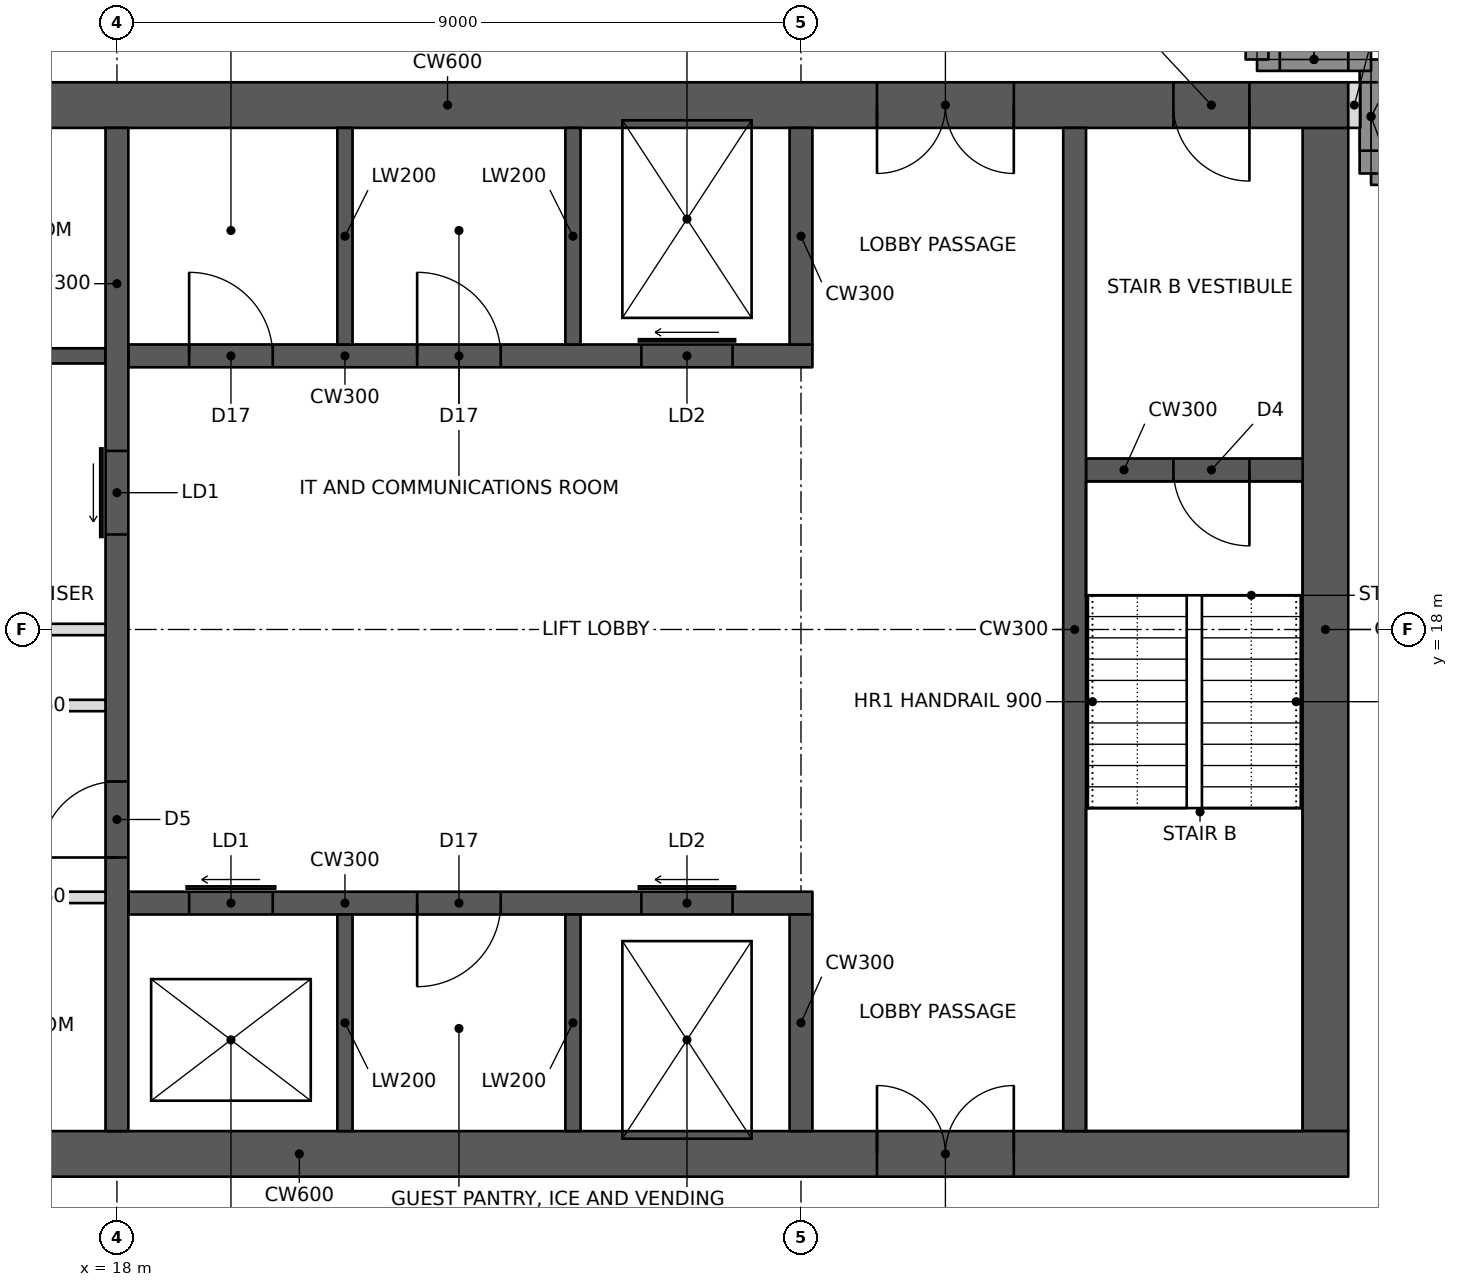
"""IFC4 building model, lengths in metres.
Left out: names, types, materials, properties, quantities, classifications, styles, units other than length and angle.
Written with IfcOpenShell. Run it as: python <this file> out.ifc"""

import sys

from ifc_helpers import new_model, si_unit, direction, frame, frame_2d, origin, place, context, subcontext, project, spatial, rectangle, extrude, element, fill, save


model = new_model("IFC4")
c1 = context("Model", 3, precision=1e-05, world=origin(), true_north=direction((0.0, 1.0)))
c2 = subcontext(c1, "Body", "Model", "MODEL_VIEW")
j1 = project(units=[si_unit("LENGTHUNIT", "METRE"), si_unit("PLANEANGLEUNIT", "RADIAN")], contexts=[c1])
p1 = place(None, origin())
s1 = spatial("IfcSite", under=j1, at=p1, CompositionType="ELEMENT")
p2 = place(p1, origin())
s2 = spatial("IfcBuilding", under=s1, at=p2, CompositionType="ELEMENT")
p3 = place(p2, frame((0.0, 0.0, 237.4)))
s3 = spatial("IfcBuildingStorey", under=s2, at=p3, CompositionType="ELEMENT", Elevation=237.4)
p4 = place(p3, frame((10.8, 11.1, 0.0), z_axis=(0.0, 0.0, 1.0), x_axis=(1.0, 0.0, 0.0)))
e1 = element("IfcWall", 1, at=p4, inside=s3, PredefinedType="SHEAR", context=c2, shape_type="SweptSolid", body=[
    extrude(rectangle(XDim=23.4, YDim=0.6, at=frame_2d((11.7, 0.0))), origin(), (0.0, 0.0, 1.0), 3.6),
])
p5 = place(p4, frame((1.0, 0.0, 0.0)))
e2 = element("IfcOpeningElement", 2, at=p5, cuts=e1, PredefinedType="OPENING", context=c2, shape_type="SweptSolid", body=[
    extrude(rectangle(XDim=1.0, YDim=2.1, at=frame_2d((0.5, 1.05))), frame((0.0, 0.31, 0.0), z_axis=(0.0, -1.0, 0.0), x_axis=(1.0, 0.0, 0.0)), (0.0, 0.0, 1.0), 0.62),
])
p6 = place(p4, frame((17.2, 0.0, 0.0)))
e3 = element("IfcOpeningElement", 3, at=p6, cuts=e1, PredefinedType="OPENING", context=c2, shape_type="SweptSolid", body=[
    extrude(rectangle(XDim=1.8, YDim=2.1, at=frame_2d((0.9, 1.05))), frame((0.0, 0.31, 0.0), z_axis=(0.0, -1.0, 0.0), x_axis=(1.0, 0.0, 0.0)), (0.0, 0.0, 1.0), 0.62),
])
p7 = place(p3, frame((10.8, 24.9, 0.0), z_axis=(0.0, 0.0, 1.0), x_axis=(1.0, 0.0, 0.0)))
e4 = element("IfcWall", 4, at=p7, inside=s3, PredefinedType="SHEAR", context=c2, shape_type="SweptSolid", body=[
    extrude(rectangle(XDim=23.4, YDim=0.6, at=frame_2d((11.7, 0.0))), origin(), (0.0, 0.0, 1.0), 3.6),
])
p8 = place(p7, frame((17.2, 0.0, 0.0)))
e5 = element("IfcOpeningElement", 5, at=p8, cuts=e4, PredefinedType="OPENING", context=c2, shape_type="SweptSolid", body=[
    extrude(rectangle(XDim=1.8, YDim=2.1, at=frame_2d((0.9, 1.05))), frame((0.0, 0.31, 0.0), z_axis=(0.0, -1.0, 0.0), x_axis=(1.0, 0.0, 0.0)), (0.0, 0.0, 1.0), 0.62),
])
p9 = place(p7, frame((21.1, 0.0, 0.0)))
e6 = element("IfcOpeningElement", 6, at=p9, cuts=e4, PredefinedType="OPENING", context=c2, shape_type="SweptSolid", body=[
    extrude(rectangle(XDim=1.0, YDim=2.1, at=frame_2d((0.5, 1.05))), frame((0.0, 0.31, 0.0), z_axis=(0.0, -1.0, 0.0), x_axis=(1.0, 0.0, 0.0)), (0.0, 0.0, 1.0), 0.62),
])
p10 = place(p7, frame((4.9, 0.0, 0.0)))
e7 = element("IfcOpeningElement", 7, at=p10, cuts=e4, PredefinedType="OPENING", context=c2, shape_type="SweptSolid", body=[
    extrude(rectangle(XDim=1.0, YDim=2.1, at=frame_2d((0.5, 1.05))), frame((0.0, 0.31, 0.0), z_axis=(0.0, -1.0, 0.0), x_axis=(1.0, 0.0, 0.0)), (0.0, 0.0, 1.0), 0.62),
])
p11 = place(p3, frame((33.9, 11.4, 0.0), z_axis=(0.0, 0.0, 1.0), x_axis=(0.0, 1.0, 0.0)))
e8 = element("IfcWall", 8, at=p11, inside=s3, PredefinedType="SHEAR", context=c2, shape_type="SweptSolid", body=[
    extrude(rectangle(XDim=13.2, YDim=0.6, at=frame_2d((6.6, 0.0))), origin(), (0.0, 0.0, 1.0), 3.6),
])
p12 = place(p3, frame((18.0, 11.4, 0.0), z_axis=(0.0, 0.0, 1.0), x_axis=(0.0, 1.0, 0.0)))
e9 = element("IfcWall", 9, at=p12, inside=s3, PredefinedType="SHEAR", context=c2, shape_type="SweptSolid", body=[
    extrude(rectangle(XDim=13.2, YDim=0.3, at=frame_2d((6.6, 0.0))), origin(), (0.0, 0.0, 1.0), 3.6),
])
p13 = place(p12, frame((3.6, 0.0, 0.0)))
e10 = element("IfcOpeningElement", 10, at=p13, cuts=e9, PredefinedType="OPENING", context=c2, shape_type="SweptSolid", body=[
    extrude(rectangle(XDim=1.0, YDim=2.1, at=frame_2d((0.5, 1.05))), frame((0.0, 0.16, 0.0), z_axis=(0.0, -1.0, 0.0), x_axis=(1.0, 0.0, 0.0)), (0.0, 0.0, 1.0), 0.32),
])
p14 = place(p12, frame((7.85, 0.0, 0.0)))
e11 = element("IfcOpeningElement", 11, at=p14, cuts=e9, PredefinedType="OPENING", context=c2, shape_type="SweptSolid", body=[
    extrude(rectangle(XDim=1.1, YDim=2.1, at=frame_2d((0.55, 1.05))), frame((0.0, 0.16, 0.0), z_axis=(0.0, -1.0, 0.0), x_axis=(1.0, 0.0, 0.0)), (0.0, 0.0, 1.0), 0.32),
])
p15 = place(p3, frame((14.55, 18.0, 0.0), z_axis=(0.0, 0.0, 1.0), x_axis=(1.0, 0.0, 0.0)))
e12 = element("IfcWall", 12, at=p15, inside=s3, PredefinedType="PARTITIONING", context=c2, shape_type="SweptSolid", body=[
    extrude(rectangle(XDim=3.3, YDim=0.15, at=frame_2d((1.65, 0.0))), origin(), (0.0, 0.0, 1.0), 3.4),
])
p16 = place(p3, frame((18.15, 14.4, 0.0), z_axis=(0.0, 0.0, 1.0), x_axis=(1.0, 0.0, 0.0)))
e13 = element("IfcWall", 13, at=p16, inside=s3, PredefinedType="SHEAR", context=c2, shape_type="SweptSolid", body=[
    extrude(rectangle(XDim=9.0, YDim=0.3, at=frame_2d((4.5, 0.0))), origin(), (0.0, 0.0, 1.0), 3.6),
])
p17 = place(p16, frame((0.8, 0.0, 0.0)))
e14 = element("IfcOpeningElement", 14, at=p17, cuts=e13, PredefinedType="OPENING", context=c2, shape_type="SweptSolid", body=[
    extrude(rectangle(XDim=1.1, YDim=2.1, at=frame_2d((0.55, 1.05))), frame((0.0, 0.16, 0.0), z_axis=(0.0, -1.0, 0.0), x_axis=(1.0, 0.0, 0.0)), (0.0, 0.0, 1.0), 0.32),
])
p18 = place(p16, frame((6.75, 0.0, 0.0)))
e15 = element("IfcOpeningElement", 15, at=p18, cuts=e13, PredefinedType="OPENING", context=c2, shape_type="SweptSolid", body=[
    extrude(rectangle(XDim=1.2, YDim=2.1, at=frame_2d((0.6, 1.05))), frame((0.0, 0.16, 0.0), z_axis=(0.0, -1.0, 0.0), x_axis=(1.0, 0.0, 0.0)), (0.0, 0.0, 1.0), 0.32),
])
p19 = place(p16, frame((3.8, 0.0, 0.0)))
e16 = element("IfcOpeningElement", 16, at=p19, cuts=e13, PredefinedType="OPENING", context=c2, shape_type="SweptSolid", body=[
    extrude(rectangle(XDim=1.1, YDim=2.1, at=frame_2d((0.55, 1.05))), frame((0.0, 0.16, 0.0), z_axis=(0.0, -1.0, 0.0), x_axis=(1.0, 0.0, 0.0)), (0.0, 0.0, 1.0), 0.32),
])
p20 = place(p3, frame((27.0, 11.4, 0.0), z_axis=(0.0, 0.0, 1.0), x_axis=(0.0, 1.0, 0.0)))
e17 = element("IfcWall", 17, at=p20, inside=s3, PredefinedType="SHEAR", context=c2, shape_type="SweptSolid", body=[
    extrude(rectangle(XDim=2.85, YDim=0.3, at=frame_2d((1.425, 0.0))), origin(), (0.0, 0.0, 1.0), 3.6),
])
for number, where, z_axis, x_axis in (
    (18, (21.0, 11.4, 0.0), (0.0, 0.0, 1.0), (0.0, 1.0, 0.0)),
    (19, (24.0, 11.4, 0.0), (0.0, 0.0, 1.0), (0.0, 1.0, 0.0)),
):
    element("IfcWall", number, at=place(p3, frame(where, z_axis=z_axis, x_axis=x_axis)), inside=s3, PredefinedType="SHEAR", context=c2, shape_type="SweptSolid", body=[
        extrude(rectangle(XDim=2.85, YDim=0.2, at=frame_2d((1.425, 0.0))), origin(), (0.0, 0.0, 1.0), 3.6),
    ])
p21 = place(p3, frame((18.15, 21.6, 0.0), z_axis=(0.0, 0.0, 1.0), x_axis=(1.0, 0.0, 0.0)))
e20 = element("IfcWall", 20, at=p21, inside=s3, PredefinedType="SHEAR", context=c2, shape_type="SweptSolid", body=[
    extrude(rectangle(XDim=9.0, YDim=0.3, at=frame_2d((4.5, 0.0))), origin(), (0.0, 0.0, 1.0), 3.6),
])
p22 = place(p21, frame((6.75, 0.0, 0.0)))
e21 = element("IfcOpeningElement", 21, at=p22, cuts=e20, PredefinedType="OPENING", context=c2, shape_type="SweptSolid", body=[
    extrude(rectangle(XDim=1.2, YDim=2.1, at=frame_2d((0.6, 1.05))), frame((0.0, 0.16, 0.0), z_axis=(0.0, -1.0, 0.0), x_axis=(1.0, 0.0, 0.0)), (0.0, 0.0, 1.0), 0.32),
])
p23 = place(p21, frame((0.8, 0.0, 0.0)))
e22 = element("IfcOpeningElement", 22, at=p23, cuts=e20, PredefinedType="OPENING", context=c2, shape_type="SweptSolid", body=[
    extrude(rectangle(XDim=1.1, YDim=2.1, at=frame_2d((0.55, 1.05))), frame((0.0, 0.16, 0.0), z_axis=(0.0, -1.0, 0.0), x_axis=(1.0, 0.0, 0.0)), (0.0, 0.0, 1.0), 0.32),
])
p24 = place(p21, frame((3.8, 0.0, 0.0)))
e23 = element("IfcOpeningElement", 23, at=p24, cuts=e20, PredefinedType="OPENING", context=c2, shape_type="SweptSolid", body=[
    extrude(rectangle(XDim=1.1, YDim=2.1, at=frame_2d((0.55, 1.05))), frame((0.0, 0.16, 0.0), z_axis=(0.0, -1.0, 0.0), x_axis=(1.0, 0.0, 0.0)), (0.0, 0.0, 1.0), 0.32),
])
p25 = place(p3, frame((27.0, 21.75, 0.0), z_axis=(0.0, 0.0, 1.0), x_axis=(0.0, 1.0, 0.0)))
e24 = element("IfcWall", 24, at=p25, inside=s3, PredefinedType="SHEAR", context=c2, shape_type="SweptSolid", body=[
    extrude(rectangle(XDim=2.85, YDim=0.3, at=frame_2d((1.425, 0.0))), origin(), (0.0, 0.0, 1.0), 3.6),
])
for number, where, z_axis, x_axis in (
    (25, (21.0, 21.75, 0.0), (0.0, 0.0, 1.0), (0.0, 1.0, 0.0)),
    (26, (24.0, 21.75, 0.0), (0.0, 0.0, 1.0), (0.0, 1.0, 0.0)),
):
    element("IfcWall", number, at=place(p3, frame(where, z_axis=z_axis, x_axis=x_axis)), inside=s3, PredefinedType="SHEAR", context=c2, shape_type="SweptSolid", body=[
        extrude(rectangle(XDim=2.85, YDim=0.2, at=frame_2d((1.425, 0.0))), origin(), (0.0, 0.0, 1.0), 3.6),
    ])
p26 = place(p3, frame((30.6, 11.4, 0.0), z_axis=(0.0, 0.0, 1.0), x_axis=(0.0, 1.0, 0.0)))
e27 = element("IfcWall", 27, at=p26, inside=s3, PredefinedType="SHEAR", context=c2, shape_type="SweptSolid", body=[
    extrude(rectangle(XDim=13.2, YDim=0.3, at=frame_2d((6.6, 0.0))), origin(), (0.0, 0.0, 1.0), 3.6),
])
p27 = place(p3, frame((30.75, 20.1, 0.0), z_axis=(0.0, 0.0, 1.0), x_axis=(1.0, 0.0, 0.0)))
e28 = element("IfcWall", 28, at=p27, inside=s3, PredefinedType="SHEAR", context=c2, shape_type="SweptSolid", body=[
    extrude(rectangle(XDim=2.85, YDim=0.3, at=frame_2d((1.425, 0.0))), origin(), (0.0, 0.0, 1.0), 3.6),
])
p28 = place(p27, frame((1.15, 0.0, 0.0)))
e29 = element("IfcOpeningElement", 29, at=p28, cuts=e28, PredefinedType="OPENING", context=c2, shape_type="SweptSolid", body=[
    extrude(rectangle(XDim=1.0, YDim=2.1, at=frame_2d((0.5, 1.05))), frame((0.0, 0.16, 0.0), z_axis=(0.0, -1.0, 0.0), x_axis=(1.0, 0.0, 0.0)), (0.0, 0.0, 1.0), 0.32),
])
p29 = place(p3, frame((14.55, 21.6, 0.0), z_axis=(0.0, 0.0, 1.0), x_axis=(1.0, 0.0, 0.0)))
e30 = element("IfcWall", 30, at=p29, inside=s3, PredefinedType="SHEAR", context=c2, shape_type="SweptSolid", body=[
    extrude(rectangle(XDim=3.3, YDim=0.2, at=frame_2d((1.65, 0.0))), origin(), (0.0, 0.0, 1.0), 3.6),
])
p30 = place(p3, frame((36.0, 24.0, 0.0), z_axis=(0.0, 0.0, 1.0), x_axis=(-1.0, 0.0, 0.0)))
e31 = element("IfcWall", 31, at=p30, inside=s3, PredefinedType="SOLIDWALL", context=c2, shape_type="SweptSolid", body=[
    extrude(rectangle(XDim=1.5, YDim=0.3, at=frame_2d((0.75, 0.0))), origin(), (0.0, 0.0, 1.0), 2.62),
])
p31 = place(p3, frame((34.5, 24.0, 0.0), z_axis=(0.0, 0.0, 1.0), x_axis=(0.0, 1.0, 0.0)))
e32 = element("IfcWall", 32, at=p31, inside=s3, PredefinedType="SOLIDWALL", context=c2, shape_type="SweptSolid", body=[
    extrude(rectangle(XDim=1.5, YDim=0.3, at=frame_2d((0.75, 0.0))), origin(), (0.0, 0.0, 1.0), 3.4),
])
p32 = place(p31, frame((0.3, 0.0, 0.6)))
e33 = element("IfcOpeningElement", 33, at=p32, cuts=e32, PredefinedType="OPENING", context=c2, shape_type="SweptSolid", body=[
    extrude(rectangle(XDim=0.9, YDim=2.2, at=frame_2d((0.45, 1.1))), frame((0.0, 0.16, 0.0), z_axis=(0.0, -1.0, 0.0), x_axis=(1.0, 0.0, 0.0)), (0.0, 0.0, 1.0), 0.32),
])
p33 = place(p3, frame((34.5, 25.5, 0.0), z_axis=(0.0, 0.0, 1.0), x_axis=(-1.0, 0.0, 0.0)))
e34 = element("IfcWall", 34, at=p33, inside=s3, PredefinedType="SOLIDWALL", context=c2, shape_type="SweptSolid", body=[
    extrude(rectangle(XDim=1.5, YDim=0.3, at=frame_2d((0.75, 0.0))), origin(), (0.0, 0.0, 1.0), 3.4),
])
p34 = place(p33, frame((0.3, 0.0, 0.6)))
e35 = element("IfcOpeningElement", 35, at=p34, cuts=e34, PredefinedType="OPENING", context=c2, shape_type="SweptSolid", body=[
    extrude(rectangle(XDim=0.9, YDim=2.2, at=frame_2d((0.45, 1.1))), frame((0.0, 0.16, 0.0), z_axis=(0.0, -1.0, 0.0), x_axis=(1.0, 0.0, 0.0)), (0.0, 0.0, 1.0), 0.32),
])
p35 = place(p3, frame((33.0, 25.5, 0.0), z_axis=(0.0, 0.0, 1.0), x_axis=(0.0, 1.0, 0.0)))
e36 = element("IfcWall", 36, at=p35, inside=s3, PredefinedType="SOLIDWALL", context=c2, shape_type="SweptSolid", body=[
    extrude(rectangle(XDim=1.5, YDim=0.3, at=frame_2d((0.75, 0.0))), origin(), (0.0, 0.0, 1.0), 2.62),
])
p36 = place(p3, frame((34.2, 24.9, 0.0), z_axis=(0.0, 0.0, 1.0), x_axis=(1.0, 0.0, 0.0)))
e37 = element("IfcWall", 37, at=p36, inside=s3, PredefinedType="PARTITIONING", context=c2, shape_type="SweptSolid", body=[
    extrude(rectangle(XDim=0.16, YDim=0.6, at=frame_2d((0.08, 0.0))), origin(), (0.0, 0.0, 1.0), 3.4),
])
p37 = place(p3, frame((14.55, 17.0, 0.0), z_axis=(0.0, 0.0, 1.0), x_axis=(1.0, 0.0, 0.0)))
e38 = element("IfcWall", 38, at=p37, inside=s3, PredefinedType="PARTITIONING", context=c2, shape_type="SweptSolid", body=[
    extrude(rectangle(XDim=3.3, YDim=0.15, at=frame_2d((1.65, 0.0))), origin(), (0.0, 0.0, 1.0), 3.4),
])
p38 = place(p37, frame((0.3, 0.0, 0.0)))
e39 = element("IfcOpeningElement", 39, at=p38, cuts=e38, PredefinedType="OPENING", context=c2, shape_type="SweptSolid", body=[
    extrude(rectangle(XDim=1.0, YDim=2.1, at=frame_2d((0.5, 1.05))), frame((0.0, 0.085, 0.0), z_axis=(0.0, -1.0, 0.0), x_axis=(1.0, 0.0, 0.0)), (0.0, 0.0, 1.0), 0.17),
])
p39 = place(p3, frame((14.55, 14.475, 0.0), z_axis=(0.0, 0.0, 1.0), x_axis=(1.0, 0.0, 0.0)))
e40 = element("IfcWall", 40, at=p39, inside=s3, PredefinedType="PARTITIONING", context=c2, shape_type="SweptSolid", body=[
    extrude(rectangle(XDim=3.3, YDim=0.15, at=frame_2d((1.65, 0.0))), origin(), (0.0, 0.0, 1.0), 3.4),
])
p40 = place(p39, frame((0.3, 0.0, 0.0)))
e41 = element("IfcOpeningElement", 41, at=p40, cuts=e40, PredefinedType="OPENING", context=c2, shape_type="SweptSolid", body=[
    extrude(rectangle(XDim=1.0, YDim=2.1, at=frame_2d((0.5, 1.05))), frame((0.0, 0.085, 0.0), z_axis=(0.0, -1.0, 0.0), x_axis=(1.0, 0.0, 0.0)), (0.0, 0.0, 1.0), 0.17),
])
p41 = place(p32, origin())
e42 = element("IfcWindow", 42, at=p41, inside=s3, PartitioningType="SINGLE_PANEL", PredefinedType="WINDOW", context=c2, shape_type="SweptSolid", body=[
    extrude(rectangle(XDim=0.9, YDim=2.2, at=frame_2d((0.45, 1.1))), frame((0.0, 0.03, 0.0), z_axis=(0.0, -1.0, 0.0), x_axis=(1.0, 0.0, 0.0)), (0.0, 0.0, 1.0), 0.06),
])
fill(e33, e42)
p42 = place(p34, origin())
e43 = element("IfcWindow", 43, at=p42, inside=s3, PartitioningType="SINGLE_PANEL", PredefinedType="WINDOW", context=c2, shape_type="SweptSolid", body=[
    extrude(rectangle(XDim=0.9, YDim=2.2, at=frame_2d((0.45, 1.1))), frame((0.0, 0.03, 0.0), z_axis=(0.0, -1.0, 0.0), x_axis=(1.0, 0.0, 0.0)), (0.0, 0.0, 1.0), 0.06),
])
fill(e35, e43)
p43 = place(p6, origin())
e44 = element("IfcDoor", 44, at=p43, inside=s3, OperationType="DOUBLE_DOOR_SINGLE_SWING", PredefinedType="DOOR", context=c2, shape_type="SweptSolid", body=[
    extrude(rectangle(XDim=1.8, YDim=2.1, at=frame_2d((0.9, 1.05))), frame((0.0, 0.025, 0.0), z_axis=(0.0, -1.0, 0.0), x_axis=(1.0, 0.0, 0.0)), (0.0, 0.0, 1.0), 0.05),
])
fill(e3, e44)
p44 = place(p8, frame((1.8, 0.0, 0.0), z_axis=(0.0, 0.0, 1.0), x_axis=(-1.0, 0.0, 0.0)))
e45 = element("IfcDoor", 45, at=p44, inside=s3, OperationType="DOUBLE_DOOR_SINGLE_SWING", PredefinedType="DOOR", context=c2, shape_type="SweptSolid", body=[
    extrude(rectangle(XDim=1.8, YDim=2.1, at=frame_2d((0.9, 1.05))), frame((0.0, 0.025, 0.0), z_axis=(0.0, -1.0, 0.0), x_axis=(1.0, 0.0, 0.0)), (0.0, 0.0, 1.0), 0.05),
])
fill(e5, e45)
p45 = place(p9, frame((1.0, 0.0, 0.0), z_axis=(0.0, 0.0, 1.0), x_axis=(-1.0, 0.0, 0.0)))
e46 = element("IfcDoor", 46, at=p45, inside=s3, OperationType="SINGLE_SWING_LEFT", PredefinedType="DOOR", context=c2, shape_type="SweptSolid", body=[
    extrude(rectangle(XDim=1.0, YDim=2.1, at=frame_2d((0.5, 1.05))), frame((0.0, 0.025, 0.0), z_axis=(0.0, -1.0, 0.0), x_axis=(1.0, 0.0, 0.0)), (0.0, 0.0, 1.0), 0.05),
])
fill(e6, e46)
p46 = place(p28, frame((1.0, 0.0, 0.0), z_axis=(0.0, 0.0, 1.0), x_axis=(-1.0, 0.0, 0.0)))
e47 = element("IfcDoor", 47, at=p46, inside=s3, OperationType="SINGLE_SWING_LEFT", PredefinedType="DOOR", context=c2, shape_type="SweptSolid", body=[
    extrude(rectangle(XDim=1.0, YDim=2.1, at=frame_2d((0.5, 1.05))), frame((0.0, 0.025, 0.0), z_axis=(0.0, -1.0, 0.0), x_axis=(1.0, 0.0, 0.0)), (0.0, 0.0, 1.0), 0.05),
])
fill(e29, e47)
p47 = place(p13, origin())
e48 = element("IfcDoor", 48, at=p47, inside=s3, OperationType="SINGLE_SWING_LEFT", PredefinedType="DOOR", context=c2, shape_type="SweptSolid", body=[
    extrude(rectangle(XDim=1.0, YDim=2.1, at=frame_2d((0.5, 1.05))), frame((0.0, 0.025, 0.0), z_axis=(0.0, -1.0, 0.0), x_axis=(1.0, 0.0, 0.0)), (0.0, 0.0, 1.0), 0.05),
])
fill(e10, e48)
p48 = place(p17, origin())
e49 = element("IfcDoor", 49, at=p48, inside=s3, OperationType="SLIDING_TO_LEFT", PredefinedType="DOOR", context=c2, shape_type="SweptSolid", body=[
    extrude(rectangle(XDim=1.1, YDim=2.1, at=frame_2d((0.55, 1.05))), frame((0.0, 0.025, 0.0), z_axis=(0.0, -1.0, 0.0), x_axis=(1.0, 0.0, 0.0)), (0.0, 0.0, 1.0), 0.05),
])
fill(e14, e49)
p49 = place(p14, origin())
e50 = element("IfcDoor", 50, at=p49, inside=s3, OperationType="SLIDING_TO_LEFT", PredefinedType="DOOR", context=c2, shape_type="SweptSolid", body=[
    extrude(rectangle(XDim=1.1, YDim=2.1, at=frame_2d((0.55, 1.05))), frame((0.0, 0.025, 0.0), z_axis=(0.0, -1.0, 0.0), x_axis=(1.0, 0.0, 0.0)), (0.0, 0.0, 1.0), 0.05),
])
fill(e11, e50)
p50 = place(p18, origin())
e51 = element("IfcDoor", 51, at=p50, inside=s3, OperationType="SLIDING_TO_LEFT", PredefinedType="DOOR", context=c2, shape_type="SweptSolid", body=[
    extrude(rectangle(XDim=1.2, YDim=2.1, at=frame_2d((0.6, 1.05))), frame((0.0, 0.025, 0.0), z_axis=(0.0, -1.0, 0.0), x_axis=(1.0, 0.0, 0.0)), (0.0, 0.0, 1.0), 0.05),
])
fill(e15, e51)
p51 = place(p22, origin())
e52 = element("IfcDoor", 52, at=p51, inside=s3, OperationType="SLIDING_TO_LEFT", PredefinedType="DOOR", context=c2, shape_type="SweptSolid", body=[
    extrude(rectangle(XDim=1.2, YDim=2.1, at=frame_2d((0.6, 1.05))), frame((0.0, 0.025, 0.0), z_axis=(0.0, -1.0, 0.0), x_axis=(1.0, 0.0, 0.0)), (0.0, 0.0, 1.0), 0.05),
])
fill(e21, e52)
p52 = place(p23, origin())
e53 = element("IfcDoor", 53, at=p52, inside=s3, OperationType="SINGLE_SWING_LEFT", PredefinedType="DOOR", context=c2, shape_type="SweptSolid", body=[
    extrude(rectangle(XDim=1.1, YDim=2.1, at=frame_2d((0.55, 1.05))), frame((0.0, 0.025, 0.0), z_axis=(0.0, -1.0, 0.0), x_axis=(1.0, 0.0, 0.0)), (0.0, 0.0, 1.0), 0.05),
])
fill(e22, e53)
p53 = place(p24, origin())
e54 = element("IfcDoor", 54, at=p53, inside=s3, OperationType="SINGLE_SWING_LEFT", PredefinedType="DOOR", context=c2, shape_type="SweptSolid", body=[
    extrude(rectangle(XDim=1.1, YDim=2.1, at=frame_2d((0.55, 1.05))), frame((0.0, 0.025, 0.0), z_axis=(0.0, -1.0, 0.0), x_axis=(1.0, 0.0, 0.0)), (0.0, 0.0, 1.0), 0.05),
])
fill(e23, e54)
p54 = place(p19, frame((1.1, 0.0, 0.0), z_axis=(0.0, 0.0, 1.0), x_axis=(-1.0, 0.0, 0.0)))
e55 = element("IfcDoor", 55, at=p54, inside=s3, OperationType="SINGLE_SWING_RIGHT", PredefinedType="DOOR", context=c2, shape_type="SweptSolid", body=[
    extrude(rectangle(XDim=1.1, YDim=2.1, at=frame_2d((0.55, 1.05))), frame((0.0, 0.025, 0.0), z_axis=(0.0, -1.0, 0.0), x_axis=(1.0, 0.0, 0.0)), (0.0, 0.0, 1.0), 0.05),
])
fill(e16, e55)
save(model, sys.argv[1])
